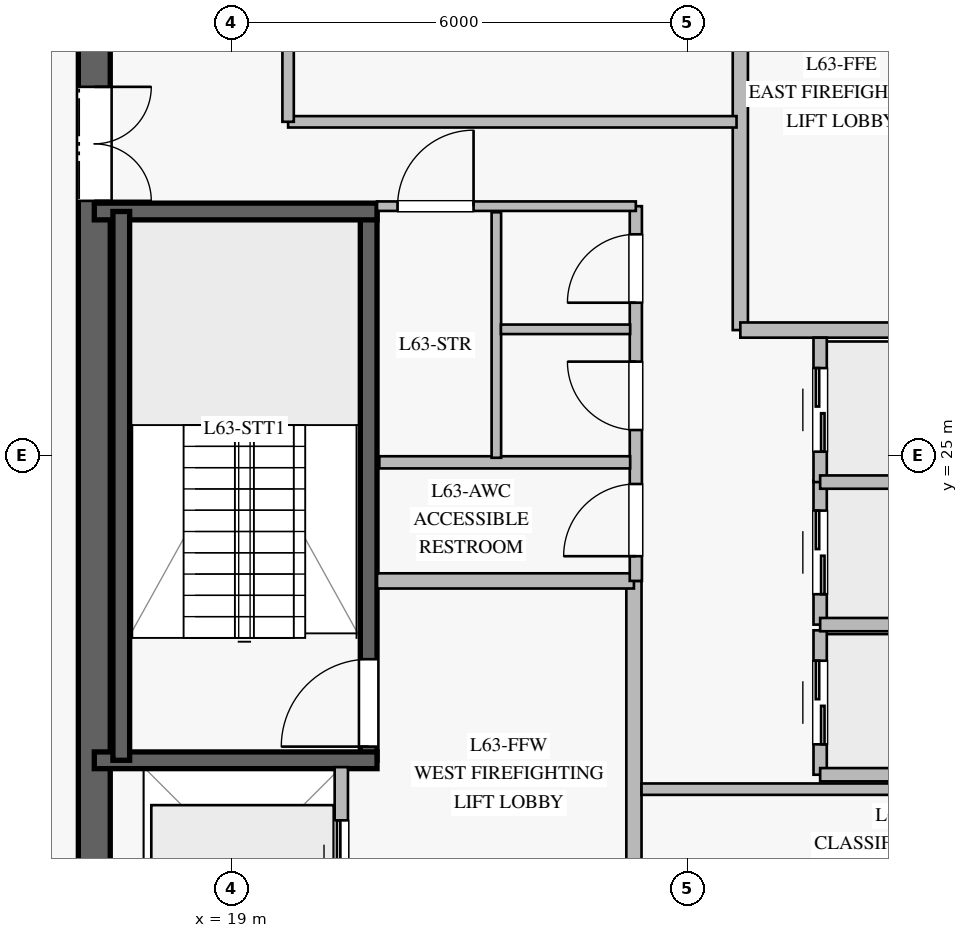
"""IFC4 building model, lengths in metres.
Left out: names, types, materials, properties, quantities, classifications, styles, units other than length and angle.
Written with IfcOpenShell. Run it as: python <this file> out.ifc"""

import sys

from ifc_helpers import new_model, si_unit, direction, frame, frame_2d, origin, place, context, subcontext, project, spatial, rectangle, extrude, element, fill, save


model = new_model("IFC4")
c1 = context("Model", 3, precision=1e-05, world=origin(), true_north=direction((0.0, 1.0)))
c2 = subcontext(c1, "Body", "Model", "MODEL_VIEW")
j1 = project(units=[si_unit("LENGTHUNIT", "METRE"), si_unit("PLANEANGLEUNIT", "RADIAN")], contexts=[c1])
p1 = place(None, origin())
s1 = spatial("IfcSite", under=j1, at=p1, CompositionType="ELEMENT")
p2 = place(p1, origin())
s2 = spatial("IfcBuilding", under=s1, at=p2, CompositionType="ELEMENT")
p3 = place(p2, frame((0.0, 0.0, 262.2)))
s3 = spatial("IfcBuildingStorey", under=s2, at=p3, CompositionType="ELEMENT", Elevation=262.2)
p4 = place(p3, frame((17.2, 31.99, 0.0), z_axis=(0.0, 0.0, 1.0), x_axis=(0.0, -1.0, 0.0)))
e1 = element("IfcWall", 1, at=p4, inside=s3, PredefinedType="SHEAR", context=c2, shape_type="SweptSolid", body=[
    extrude(rectangle(XDim=13.98, YDim=0.42, at=frame_2d((6.99, 0.0))), origin(), (0.0, 0.0, 1.0), 3.78),
])
p5 = place(p4, frame((2.14, 0.0, 0.0)))
e2 = element("IfcOpeningElement", 2, at=p5, cuts=e1, PredefinedType="OPENING", context=c2, shape_type="SweptSolid", body=[
    extrude(rectangle(XDim=1.5, YDim=2.2, at=frame_2d((0.75, 1.1))), frame((0.0, 0.22, 0.0), z_axis=(0.0, -1.0, 0.0), x_axis=(1.0, 0.0, 0.0)), (0.0, 0.0, 1.0), 0.44),
])
p6 = place(p3, frame((20.81, 20.99, 0.0), z_axis=(0.0, 0.0, 1.0), x_axis=(0.0, 1.0, 0.0)))
e3 = element("IfcWall", 3, at=p6, inside=s3, PredefinedType="SOLIDWALL", context=c2, shape_type="SweptSolid", body=[
    extrude(rectangle(XDim=7.22, YDim=0.22, at=frame_2d((3.61, 0.0))), origin(), (0.0, 0.0, 1.0), 3.78),
])
p7 = place(p6, frame((0.18, 0.0, 0.0)))
e4 = element("IfcOpeningElement", 4, at=p7, cuts=e3, PredefinedType="OPENING", context=c2, shape_type="SweptSolid", body=[
    extrude(rectangle(XDim=1.15, YDim=2.2, at=frame_2d((0.575, 1.1))), frame((0.0, 0.12, 0.0), z_axis=(0.0, -1.0, 0.0), x_axis=(1.0, 0.0, 0.0)), (0.0, 0.0, 1.0), 0.24),
])
for number, where, z_axis, x_axis in (
    (5, (17.2, 20.99, 0.0), (0.0, 0.0, 1.0), (1.0, 0.0, 0.0)),
    (6, (17.2, 28.21, 0.0), (0.0, 0.0, 1.0), (1.0, 0.0, 0.0)),
):
    element("IfcWall", number, at=place(p3, frame(where, z_axis=z_axis, x_axis=x_axis)), inside=s3, PredefinedType="SOLIDWALL", context=c2, shape_type="SweptSolid", body=[
        extrude(rectangle(XDim=3.72, YDim=0.22, at=frame_2d((1.86, 0.0))), origin(), (0.0, 0.0, 1.0), 3.78),
    ])
p8 = place(p3, frame((17.555, 28.21, 0.0), z_axis=(0.0, 0.0, 1.0), x_axis=(0.0, -1.0, 0.0)))
e7 = element("IfcWall", 7, at=p8, inside=s3, PredefinedType="SOLIDWALL", context=c2, shape_type="SweptSolid", body=[
    extrude(rectangle(XDim=7.22, YDim=0.22, at=frame_2d((3.61, 0.0))), origin(), (0.0, 0.0, 1.0), 3.78),
])
p9 = place(p3, frame((24.3, 18.2, 0.0), z_axis=(0.0, 0.0, 1.0), x_axis=(0.0, 1.0, 0.0)))
e8 = element("IfcWall", 8, at=p9, inside=s3, PredefinedType="PARTITIONING", context=c2, shape_type="SweptSolid", body=[
    extrude(rectangle(XDim=5.15, YDim=0.2, at=frame_2d((2.575, 0.0))), origin(), (0.0, 0.0, 1.0), 3.78),
])
p10 = place(p3, frame((20.92, 23.35, 0.0), z_axis=(0.0, 0.0, 1.0), x_axis=(1.0, 0.0, 0.0)))
e9 = element("IfcWall", 9, at=p10, inside=s3, PredefinedType="PARTITIONING", context=c2, shape_type="SweptSolid", body=[
    extrude(rectangle(XDim=3.38, YDim=0.2, at=frame_2d((1.69, 0.0))), origin(), (0.0, 0.0, 1.0), 3.78),
])
p11 = place(p3, frame((25.7, 26.65, 0.0), z_axis=(0.0, 0.0, 1.0), x_axis=(0.0, 1.0, 0.0)))
e10 = element("IfcWall", 10, at=p11, inside=s3, PredefinedType="PARTITIONING", context=c2, shape_type="SweptSolid", body=[
    extrude(rectangle(XDim=5.15, YDim=0.2, at=frame_2d((2.575, 0.0))), origin(), (0.0, 0.0, 1.0), 3.78),
])
p12 = place(p3, frame((25.7, 26.65, 0.0), z_axis=(0.0, 0.0, 1.0), x_axis=(1.0, 0.0, 0.0)))
e11 = element("IfcWall", 11, at=p12, inside=s3, PredefinedType="PARTITIONING", context=c2, shape_type="SweptSolid", body=[
    extrude(rectangle(XDim=3.38, YDim=0.2, at=frame_2d((1.69, 0.0))), origin(), (0.0, 0.0, 1.0), 3.78),
])
p13 = place(p3, frame((24.325, 23.35, 0.0), z_axis=(0.0, 0.0, 1.0), x_axis=(0.0, 1.0, 0.0)))
e12 = element("IfcWall", 12, at=p13, inside=s3, PredefinedType="PLUMBINGWALL", context=c2, shape_type="SweptSolid", body=[
    extrude(rectangle(XDim=4.93, YDim=0.16, at=frame_2d((2.465, 0.0))), origin(), (0.0, 0.0, 1.0), 3.78),
])
p14 = place(p13, frame((0.325, 0.0, 0.0)))
e13 = element("IfcOpeningElement", 13, at=p14, cuts=e12, PredefinedType="OPENING", context=c2, shape_type="SweptSolid", body=[
    extrude(rectangle(XDim=0.95, YDim=2.1, at=frame_2d((0.475, 1.05))), frame((0.0, 0.09, 0.0), z_axis=(0.0, -1.0, 0.0), x_axis=(1.0, 0.0, 0.0)), (0.0, 0.0, 1.0), 0.18),
])
p15 = place(p13, frame((1.985, 0.0, 0.0)))
e14 = element("IfcOpeningElement", 14, at=p15, cuts=e12, PredefinedType="OPENING", context=c2, shape_type="SweptSolid", body=[
    extrude(rectangle(XDim=0.9, YDim=2.1, at=frame_2d((0.45, 1.05))), frame((0.0, 0.09, 0.0), z_axis=(0.0, -1.0, 0.0), x_axis=(1.0, 0.0, 0.0)), (0.0, 0.0, 1.0), 0.18),
])
p16 = place(p13, frame((3.66, 0.0, 0.0)))
e15 = element("IfcOpeningElement", 15, at=p16, cuts=e12, PredefinedType="OPENING", context=c2, shape_type="SweptSolid", body=[
    extrude(rectangle(XDim=0.9, YDim=2.1, at=frame_2d((0.45, 1.05))), frame((0.0, 0.09, 0.0), z_axis=(0.0, -1.0, 0.0), x_axis=(1.0, 0.0, 0.0)), (0.0, 0.0, 1.0), 0.18),
])
p17 = place(p3, frame((20.92, 28.28, 0.0), z_axis=(0.0, 0.0, 1.0), x_axis=(1.0, 0.0, 0.0)))
e16 = element("IfcWall", 16, at=p17, inside=s3, PredefinedType="PARTITIONING", context=c2, shape_type="SweptSolid", body=[
    extrude(rectangle(XDim=3.405, YDim=0.125, at=frame_2d((1.703, 0.0))), origin(), (0.0, 0.0, 1.0), 3.78),
])
p18 = place(p17, frame((0.27, 0.0, 0.0)))
e17 = element("IfcOpeningElement", 17, at=p18, cuts=e16, PredefinedType="OPENING", context=c2, shape_type="SweptSolid", body=[
    extrude(rectangle(XDim=1.0, YDim=2.15, at=frame_2d((0.5, 1.075))), frame((0.0, 0.073, 0.0), z_axis=(0.0, -1.0, 0.0), x_axis=(1.0, 0.0, 0.0)), (0.0, 0.0, 1.0), 0.145),
])
p19 = place(p3, frame((20.95, 24.91, 0.0), z_axis=(0.0, 0.0, 1.0), x_axis=(1.0, 0.0, 0.0)))
e18 = element("IfcWall", 18, at=p19, inside=s3, PredefinedType="PLUMBINGWALL", context=c2, shape_type="SweptSolid", body=[
    extrude(rectangle(XDim=3.3, YDim=0.16, at=frame_2d((1.65, 0.0))), origin(), (0.0, 0.0, 1.0), 3.78),
])
p20 = place(p3, frame((22.49, 24.97, 0.0), z_axis=(0.0, 0.0, 1.0), x_axis=(0.0, 1.0, 0.0)))
e19 = element("IfcWall", 19, at=p20, inside=s3, PredefinedType="PARTITIONING", context=c2, shape_type="SweptSolid", body=[
    extrude(rectangle(XDim=3.23, YDim=0.125, at=frame_2d((1.615, 0.0))), origin(), (0.0, 0.0, 1.0), 3.78),
])
p21 = place(p3, frame((22.55, 26.66, 0.0), z_axis=(0.0, 0.0, 1.0), x_axis=(1.0, 0.0, 0.0)))
e20 = element("IfcWall", 20, at=p21, inside=s3, PredefinedType="PARTITIONING", context=c2, shape_type="SweptSolid", body=[
    extrude(rectangle(XDim=1.7, YDim=0.125, at=frame_2d((0.85, 0.0))), origin(), (0.0, 0.0, 1.0), 3.78),
])
p22 = place(p3, frame((24.4, 20.61, 0.0), z_axis=(0.0, 0.0, 1.0), x_axis=(1.0, 0.0, 0.0)))
e21 = element("IfcWall", 21, at=p22, inside=s3, PredefinedType="PARTITIONING", context=c2, shape_type="SweptSolid", body=[
    extrude(rectangle(XDim=5.9, YDim=0.15, at=frame_2d((2.95, 0.0))), origin(), (0.0, 0.0, 1.0), 3.78),
])
p23 = place(p3, frame((19.75, 29.39, 0.0), z_axis=(0.0, 0.0, 1.0), x_axis=(1.0, 0.0, 0.0)))
e22 = element("IfcWall", 22, at=p23, inside=s3, PredefinedType="PARTITIONING", context=c2, shape_type="SweptSolid", body=[
    extrude(rectangle(XDim=5.9, YDim=0.15, at=frame_2d((2.95, 0.0))), origin(), (0.0, 0.0, 1.0), 3.78),
])
p24 = place(p3, frame((19.75, 29.39, 0.0), z_axis=(0.0, 0.0, 1.0), x_axis=(0.0, 1.0, 0.0)))
e23 = element("IfcWall", 23, at=p24, inside=s3, PredefinedType="PARTITIONING", context=c2, shape_type="SweptSolid", body=[
    extrude(rectangle(XDim=2.41, YDim=0.15, at=frame_2d((1.205, 0.0))), origin(), (0.0, 0.0, 1.0), 3.78),
])
p25 = place(p3, frame((26.75, 20.8, 0.0), z_axis=(0.0, 0.0, 1.0), x_axis=(0.0, 1.0, 0.0)))
e24 = element("IfcWall", 24, at=p25, inside=s3, PredefinedType="PARTITIONING", context=c2, shape_type="SweptSolid", body=[
    extrude(rectangle(XDim=1.9, YDim=0.175, at=frame_2d((0.95, 0.0))), origin(), (0.0, 0.0, 1.0), 3.78),
])
p26 = place(p25, frame((0.4, 0.0, 0.0)))
e25 = element("IfcOpeningElement", 25, at=p26, cuts=e24, PredefinedType="OPENING", context=c2, shape_type="SweptSolid", body=[
    extrude(rectangle(XDim=1.1, YDim=2.2, at=frame_2d((0.55, 1.1))), frame((0.0, 0.098, 0.0), z_axis=(0.0, -1.0, 0.0), x_axis=(1.0, 0.0, 0.0)), (0.0, 0.0, 1.0), 0.195),
])
p27 = place(p3, frame((26.75, 20.8, 0.0), z_axis=(0.0, 0.0, 1.0), x_axis=(1.0, 0.0, 0.0)))
e26 = element("IfcWall", 26, at=p27, inside=s3, PredefinedType="PARTITIONING", context=c2, shape_type="SweptSolid", body=[
    extrude(rectangle(XDim=2.35, YDim=0.175, at=frame_2d((1.175, 0.0))), origin(), (0.0, 0.0, 1.0), 3.78),
])
p28 = place(p3, frame((26.75, 22.775, 0.0), z_axis=(0.0, 0.0, 1.0), x_axis=(0.0, 1.0, 0.0)))
e27 = element("IfcWall", 27, at=p28, inside=s3, PredefinedType="PARTITIONING", context=c2, shape_type="SweptSolid", body=[
    extrude(rectangle(XDim=1.9, YDim=0.175, at=frame_2d((0.95, 0.0))), origin(), (0.0, 0.0, 1.0), 3.78),
])
p29 = place(p28, frame((0.4, 0.0, 0.0)))
e28 = element("IfcOpeningElement", 28, at=p29, cuts=e27, PredefinedType="OPENING", context=c2, shape_type="SweptSolid", body=[
    extrude(rectangle(XDim=1.1, YDim=2.2, at=frame_2d((0.55, 1.1))), frame((0.0, 0.098, 0.0), z_axis=(0.0, -1.0, 0.0), x_axis=(1.0, 0.0, 0.0)), (0.0, 0.0, 1.0), 0.195),
])
p30 = place(p3, frame((26.75, 22.775, 0.0), z_axis=(0.0, 0.0, 1.0), x_axis=(1.0, 0.0, 0.0)))
e29 = element("IfcWall", 29, at=p30, inside=s3, PredefinedType="PARTITIONING", context=c2, shape_type="SweptSolid", body=[
    extrude(rectangle(XDim=2.35, YDim=0.175, at=frame_2d((1.175, 0.0))), origin(), (0.0, 0.0, 1.0), 3.78),
])
p31 = place(p3, frame((26.75, 24.65, 0.0), z_axis=(0.0, 0.0, 1.0), x_axis=(0.0, 1.0, 0.0)))
e30 = element("IfcWall", 30, at=p31, inside=s3, PredefinedType="PARTITIONING", context=c2, shape_type="SweptSolid", body=[
    extrude(rectangle(XDim=1.9, YDim=0.175, at=frame_2d((0.95, 0.0))), origin(), (0.0, 0.0, 1.0), 3.78),
])
p32 = place(p31, frame((0.4, 0.0, 0.0)))
e31 = element("IfcOpeningElement", 31, at=p32, cuts=e30, PredefinedType="OPENING", context=c2, shape_type="SweptSolid", body=[
    extrude(rectangle(XDim=1.1, YDim=2.2, at=frame_2d((0.55, 1.1))), frame((0.0, 0.098, 0.0), z_axis=(0.0, -1.0, 0.0), x_axis=(1.0, 0.0, 0.0)), (0.0, 0.0, 1.0), 0.195),
])
p33 = place(p3, frame((26.75, 24.65, 0.0), z_axis=(0.0, 0.0, 1.0), x_axis=(1.0, 0.0, 0.0)))
e32 = element("IfcWall", 32, at=p33, inside=s3, PredefinedType="PARTITIONING", context=c2, shape_type="SweptSolid", body=[
    extrude(rectangle(XDim=2.35, YDim=0.175, at=frame_2d((1.175, 0.0))), origin(), (0.0, 0.0, 1.0), 3.78),
])
p34 = place(p3, frame((20.45, 18.3, 0.0), z_axis=(0.0, 0.0, 1.0), x_axis=(0.0, 1.0, 0.0)))
e33 = element("IfcWall", 33, at=p34, inside=s3, PredefinedType="PARTITIONING", context=c2, shape_type="SweptSolid", body=[
    extrude(rectangle(XDim=2.6, YDim=0.175, at=frame_2d((1.3, 0.0))), origin(), (0.0, 0.0, 1.0), 3.78),
])
p35 = place(p34, frame((0.7, 0.0, 0.0)))
e34 = element("IfcOpeningElement", 34, at=p35, cuts=e33, PredefinedType="OPENING", context=c2, shape_type="SweptSolid", body=[
    extrude(rectangle(XDim=1.2, YDim=2.2, at=frame_2d((0.6, 1.1))), frame((0.0, 0.098, 0.0), z_axis=(0.0, -1.0, 0.0), x_axis=(1.0, 0.0, 0.0)), (0.0, 0.0, 1.0), 0.195),
])
p36 = place(p7, origin())
e35 = element("IfcDoor", 35, at=p36, inside=s3, OperationType="SINGLE_SWING_LEFT", PredefinedType="DOOR", context=c2, shape_type="SweptSolid", body=[
    extrude(rectangle(XDim=1.15, YDim=2.2, at=frame_2d((0.575, 1.1))), frame((0.0, 0.025, 0.0), z_axis=(0.0, -1.0, 0.0), x_axis=(1.0, 0.0, 0.0)), (0.0, 0.0, 1.0), 0.05),
])
fill(e4, e35)
p37 = place(p5, origin())
e36 = element("IfcDoor", 36, at=p37, inside=s3, OperationType="DOUBLE_DOOR_SINGLE_SWING", PredefinedType="DOOR", context=c2, shape_type="SweptSolid", body=[
    extrude(rectangle(XDim=1.5, YDim=2.2, at=frame_2d((0.75, 1.1))), frame((0.0, 0.025, 0.0), z_axis=(0.0, -1.0, 0.0), x_axis=(1.0, 0.0, 0.0)), (0.0, 0.0, 1.0), 0.05),
])
fill(e2, e36)
p38 = place(p14, origin())
e37 = element("IfcDoor", 37, at=p38, inside=s3, OperationType="SINGLE_SWING_LEFT", PredefinedType="DOOR", context=c2, shape_type="SweptSolid", body=[
    extrude(rectangle(XDim=0.95, YDim=2.1, at=frame_2d((0.475, 1.05))), frame((0.0, 0.025, 0.0), z_axis=(0.0, -1.0, 0.0), x_axis=(1.0, 0.0, 0.0)), (0.0, 0.0, 1.0), 0.05),
])
fill(e13, e37)
p39 = place(p15, origin())
e38 = element("IfcDoor", 38, at=p39, inside=s3, OperationType="SINGLE_SWING_RIGHT", PredefinedType="DOOR", context=c2, shape_type="SweptSolid", body=[
    extrude(rectangle(XDim=0.9, YDim=2.1, at=frame_2d((0.45, 1.05))), frame((0.0, 0.025, 0.0), z_axis=(0.0, -1.0, 0.0), x_axis=(1.0, 0.0, 0.0)), (0.0, 0.0, 1.0), 0.05),
])
fill(e14, e38)
p40 = place(p16, origin())
e39 = element("IfcDoor", 39, at=p40, inside=s3, OperationType="SINGLE_SWING_LEFT", PredefinedType="DOOR", context=c2, shape_type="SweptSolid", body=[
    extrude(rectangle(XDim=0.9, YDim=2.1, at=frame_2d((0.45, 1.05))), frame((0.0, 0.025, 0.0), z_axis=(0.0, -1.0, 0.0), x_axis=(1.0, 0.0, 0.0)), (0.0, 0.0, 1.0), 0.05),
])
fill(e15, e39)
p41 = place(p18, origin())
e40 = element("IfcDoor", 40, at=p41, inside=s3, OperationType="SINGLE_SWING_RIGHT", PredefinedType="DOOR", context=c2, shape_type="SweptSolid", body=[
    extrude(rectangle(XDim=1.0, YDim=2.15, at=frame_2d((0.5, 1.075))), frame((0.0, 0.025, 0.0), z_axis=(0.0, -1.0, 0.0), x_axis=(1.0, 0.0, 0.0)), (0.0, 0.0, 1.0), 0.05),
])
fill(e17, e40)
p42 = place(p26, origin())
e41 = element("IfcDoor", 41, at=p42, inside=s3, OperationType="DOUBLE_DOOR_SLIDING", PredefinedType="DOOR", context=c2, shape_type="SweptSolid", body=[
    extrude(rectangle(XDim=1.1, YDim=2.2, at=frame_2d((0.55, 1.1))), frame((0.0, 0.025, 0.0), z_axis=(0.0, -1.0, 0.0), x_axis=(1.0, 0.0, 0.0)), (0.0, 0.0, 1.0), 0.05),
])
fill(e25, e41)
p43 = place(p29, origin())
e42 = element("IfcDoor", 42, at=p43, inside=s3, OperationType="DOUBLE_DOOR_SLIDING", PredefinedType="DOOR", context=c2, shape_type="SweptSolid", body=[
    extrude(rectangle(XDim=1.1, YDim=2.2, at=frame_2d((0.55, 1.1))), frame((0.0, 0.025, 0.0), z_axis=(0.0, -1.0, 0.0), x_axis=(1.0, 0.0, 0.0)), (0.0, 0.0, 1.0), 0.05),
])
fill(e28, e42)
p44 = place(p32, origin())
e43 = element("IfcDoor", 43, at=p44, inside=s3, OperationType="DOUBLE_DOOR_SLIDING", PredefinedType="DOOR", context=c2, shape_type="SweptSolid", body=[
    extrude(rectangle(XDim=1.1, YDim=2.2, at=frame_2d((0.55, 1.1))), frame((0.0, 0.025, 0.0), z_axis=(0.0, -1.0, 0.0), x_axis=(1.0, 0.0, 0.0)), (0.0, 0.0, 1.0), 0.05),
])
fill(e31, e43)
p45 = place(p35, origin())
e44 = element("IfcDoor", 44, at=p45, inside=s3, OperationType="DOUBLE_DOOR_SLIDING", PredefinedType="DOOR", context=c2, shape_type="SweptSolid", body=[
    extrude(rectangle(XDim=1.2, YDim=2.2, at=frame_2d((0.6, 1.1))), frame((0.0, 0.025, 0.0), z_axis=(0.0, -1.0, 0.0), x_axis=(1.0, 0.0, 0.0)), (0.0, 0.0, 1.0), 0.05),
])
fill(e34, e44)
save(model, sys.argv[1])
